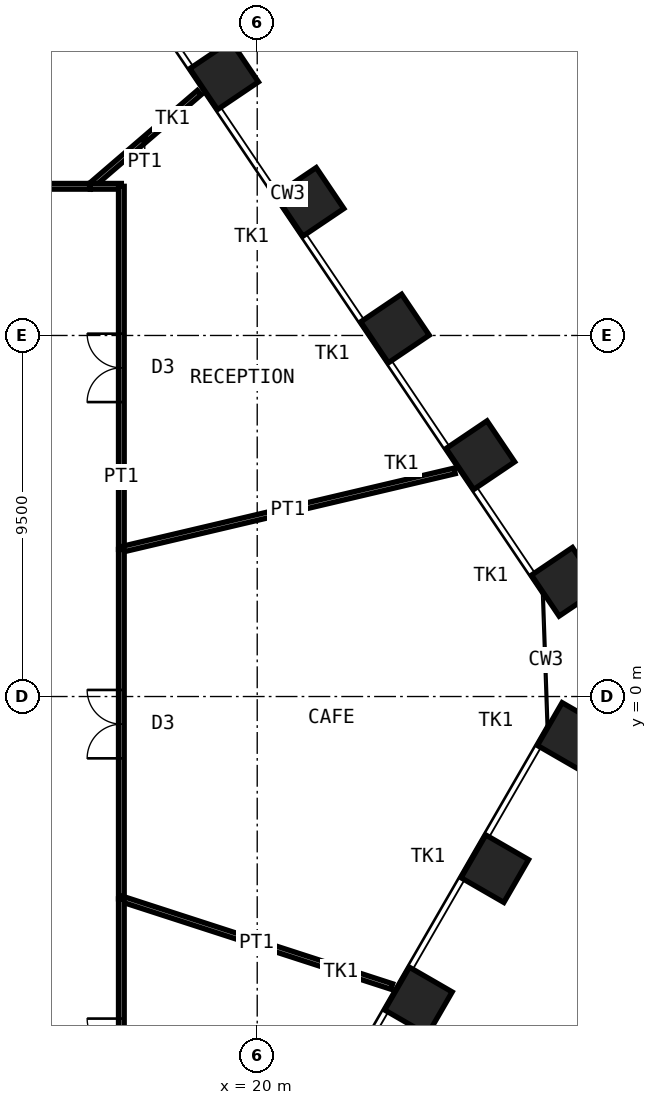
"""IFC4 building model, lengths in metres.
Left out: names, types, materials, properties, quantities, classifications, styles, units other than length and angle.
Written with IfcOpenShell. Run it as: python <this file> out.ifc"""

import sys

from ifc_helpers import new_model, si_unit, direction, frame, frame_2d, origin, origin_2d, place, context, subcontext, project, spatial, rectangle, hollow_rectangle, extrude, element, fill, save


model = new_model("IFC4")
c1 = context("Model", 3, precision=1e-05, world=origin(), true_north=direction((0.0, 1.0)))
c2 = subcontext(c1, "Body", "Model", "MODEL_VIEW")
j1 = project(units=[si_unit("LENGTHUNIT", "METRE"), si_unit("PLANEANGLEUNIT", "RADIAN")], contexts=[c1])
p1 = place(None, origin())
s1 = spatial("IfcSite", under=j1, at=p1, CompositionType="ELEMENT")
p2 = place(p1, origin())
s2 = spatial("IfcBuilding", under=s1, at=p2, CompositionType="ELEMENT")
p3 = place(p2, frame((0.0, 0.0, 103.0)))
s3 = spatial("IfcBuildingStorey", under=s2, at=p3, CompositionType="ELEMENT", Elevation=103.0)
for number, where, z_axis, x_axis in (
    (1, (19.13, 16.346, 0.0), (0.0, 0.0, 1.0), (-0.559, 0.829, 0.0)),
    (2, (21.377, 13.014, 0.0), (0.0, 0.0, 1.0), (-0.559, 0.829, 0.0)),
    (3, (23.625, 9.682, 0.0), (0.0, 0.0, 1.0), (-0.559, 0.829, 0.0)),
    (4, (25.872, 6.351, 0.0), (0.0, 0.0, 1.0), (-0.559, 0.829, 0.0)),
    (5, (28.119, 3.019, 0.0), (0.0, 0.0, 1.0), (-0.559, 0.829, 0.0)),
    (6, (28.261, -1.05, 0.0), (0.0, 0.0, 1.0), (0.5, 0.866, 0.0)),
    (7, (26.252, -4.53, 0.0), (0.0, 0.0, 1.0), (0.5, 0.866, 0.0)),
    (8, (24.242, -8.011, 0.0), (0.0, 0.0, 1.0), (0.5, 0.866, 0.0)),
):
    element("IfcColumn", number, at=place(p3, frame(where, z_axis=z_axis, x_axis=x_axis)), inside=s3, PredefinedType="COLUMN", context=c2, shape_type="SweptSolid", body=[
        extrude(hollow_rectangle(XDim=1.3, YDim=1.3, WallThickness=0.1, at=origin_2d()), origin(), (0.0, 0.0, 1.0), 4.2),
    ])
p4 = place(p3, frame((1.577, 13.425, 0.0), z_axis=(0.0, 0.0, 1.0), x_axis=(1.0, 0.0, 0.0)))
e9 = element("IfcWall", 9, at=p4, inside=s3, PredefinedType="PARTITIONING", context=c2, shape_type="SweptSolid", body=[
    extrude(rectangle(XDim=14.031, YDim=0.15, at=frame_2d((7.015, 0.0))), origin(), (0.0, 0.0, 1.0), 4.03),
])
p5 = place(p4, frame((6.115, 0.0, 0.0)))
e10 = element("IfcOpeningElement", 10, at=p5, cuts=e9, PredefinedType="OPENING", context=c2, shape_type="SweptSolid", body=[
    extrude(rectangle(XDim=1.8, YDim=2.4, at=frame_2d((0.9, 1.2))), frame((0.0, 0.085, 0.0), z_axis=(0.0, -1.0, 0.0), x_axis=(1.0, 0.0, 0.0)), (0.0, 0.0, 1.0), 0.17),
])
p6 = place(p3, frame((18.474, 15.89, 0.0), z_axis=(0.0, 0.0, 1.0), x_axis=(-0.758174978019, -0.652051150375, 0.0)))
e11 = element("IfcWall", 11, at=p6, inside=s3, PredefinedType="PARTITIONING", context=c2, shape_type="SweptSolid", body=[
    extrude(rectangle(XDim=3.78, YDim=0.15, at=frame_2d((1.89, 0.0))), origin(), (0.0, 0.0, 1.0), 2.93),
])
p7 = place(p3, frame((15.608, 13.425, 0.0), z_axis=(0.0, 0.0, 1.0), x_axis=(1.0, 0.0, 0.0)))
e12 = element("IfcWall", 12, at=p7, inside=s3, PredefinedType="PARTITIONING", context=c2, shape_type="SweptSolid", body=[
    extrude(rectangle(XDim=0.817, YDim=0.15, at=frame_2d((0.409, 0.0))), origin(), (0.0, 0.0, 1.0), 4.03),
])
p8 = place(p3, frame((16.425, 13.425, 0.0), z_axis=(0.0, 0.0, 1.0), x_axis=(0.0, -1.0, 0.0)))
e13 = element("IfcWall", 13, at=p8, inside=s3, PredefinedType="PARTITIONING", context=c2, shape_type="SweptSolid", body=[
    extrude(rectangle(XDim=9.555, YDim=0.15, at=frame_2d((4.778, 0.0))), origin(), (0.0, 0.0, 1.0), 4.03),
])
p9 = place(p8, frame((3.877, 0.0, 0.0)))
e14 = element("IfcOpeningElement", 14, at=p9, cuts=e13, PredefinedType="OPENING", context=c2, shape_type="SweptSolid", body=[
    extrude(rectangle(XDim=1.8, YDim=2.4, at=frame_2d((0.9, 1.2))), frame((0.0, 0.085, 0.0), z_axis=(0.0, -1.0, 0.0), x_axis=(1.0, 0.0, 0.0)), (0.0, 0.0, 1.0), 0.17),
])
p10 = place(p3, frame((25.194, 5.936, 0.0), z_axis=(0.0, 0.0, 1.0), x_axis=(-0.973347822921, -0.229333851872, 0.0)))
e15 = element("IfcWall", 15, at=p10, inside=s3, PredefinedType="PARTITIONING", context=c2, shape_type="SweptSolid", body=[
    extrude(rectangle(XDim=9.01, YDim=0.15, at=frame_2d((4.505, 0.0))), origin(), (0.0, 0.0, 1.0), 2.93),
])
p11 = place(p3, frame((16.425, 3.87, 0.0), z_axis=(0.0, 0.0, 1.0), x_axis=(0.0, -1.0, 0.0)))
e16 = element("IfcWall", 16, at=p11, inside=s3, PredefinedType="PARTITIONING", context=c2, shape_type="SweptSolid", body=[
    extrude(rectangle(XDim=9.194, YDim=0.15, at=frame_2d((4.597, 0.0))), origin(), (0.0, 0.0, 1.0), 4.03),
])
p12 = place(p11, frame((3.697, 0.0, 0.0)))
e17 = element("IfcOpeningElement", 17, at=p12, cuts=e16, PredefinedType="OPENING", context=c2, shape_type="SweptSolid", body=[
    extrude(rectangle(XDim=1.8, YDim=2.4, at=frame_2d((0.9, 1.2))), frame((0.0, 0.085, 0.0), z_axis=(0.0, -1.0, 0.0), x_axis=(1.0, 0.0, 0.0)), (0.0, 0.0, 1.0), 0.17),
])
p13 = place(p3, frame((23.541, -7.63, 0.0), z_axis=(0.0, 0.0, 1.0), x_axis=(-0.951281044472, 0.308325111577, 0.0)))
e18 = element("IfcWall", 18, at=p13, inside=s3, PredefinedType="PARTITIONING", context=c2, shape_type="SweptSolid", body=[
    extrude(rectangle(XDim=7.48, YDim=0.15, at=frame_2d((3.74, 0.0))), origin(), (0.0, 0.0, 1.0), 2.93),
])
p14 = place(p3, frame((16.425, -5.324, 0.0), z_axis=(0.0, 0.0, 1.0), x_axis=(0.0, -1.0, 0.0)))
e19 = element("IfcWall", 19, at=p14, inside=s3, PredefinedType="PARTITIONING", context=c2, shape_type="SweptSolid", body=[
    extrude(rectangle(XDim=8.101, YDim=0.15, at=frame_2d((4.051, 0.0))), origin(), (0.0, 0.0, 1.0), 4.03),
])
p15 = place(p14, frame((3.151, 0.0, 0.0)))
e20 = element("IfcOpeningElement", 20, at=p15, cuts=e19, PredefinedType="OPENING", context=c2, shape_type="SweptSolid", body=[
    extrude(rectangle(XDim=1.8, YDim=2.4, at=frame_2d((0.9, 1.2))), frame((0.0, 0.085, 0.0), z_axis=(0.0, -1.0, 0.0), x_axis=(1.0, 0.0, 0.0)), (0.0, 0.0, 1.0), 0.17),
])
p16 = place(p9, origin())
e21 = element("IfcDoor", 21, at=p16, inside=s3, OperationType="DOUBLE_DOOR_DOUBLE_SWING", PredefinedType="DOOR", context=c2, shape_type="SweptSolid", body=[
    extrude(rectangle(XDim=1.8, YDim=2.4, at=frame_2d((0.9, 1.2))), frame((0.0, 0.025, 0.0), z_axis=(0.0, -1.0, 0.0), x_axis=(1.0, 0.0, 0.0)), (0.0, 0.0, 1.0), 0.05),
])
fill(e14, e21)
p17 = place(p12, origin())
e22 = element("IfcDoor", 22, at=p17, inside=s3, OperationType="DOUBLE_DOOR_DOUBLE_SWING", PredefinedType="DOOR", context=c2, shape_type="SweptSolid", body=[
    extrude(rectangle(XDim=1.8, YDim=2.4, at=frame_2d((0.9, 1.2))), frame((0.0, 0.025, 0.0), z_axis=(0.0, -1.0, 0.0), x_axis=(1.0, 0.0, 0.0)), (0.0, 0.0, 1.0), 0.05),
])
fill(e17, e22)
p18 = place(p15, origin())
e23 = element("IfcDoor", 23, at=p18, inside=s3, OperationType="DOUBLE_DOOR_DOUBLE_SWING", PredefinedType="DOOR", context=c2, shape_type="SweptSolid", body=[
    extrude(rectangle(XDim=1.8, YDim=2.4, at=frame_2d((0.9, 1.2))), frame((0.0, 0.025, 0.0), z_axis=(0.0, -1.0, 0.0), x_axis=(1.0, 0.0, 0.0)), (0.0, 0.0, 1.0), 0.05),
])
fill(e20, e23)
save(model, sys.argv[1])
